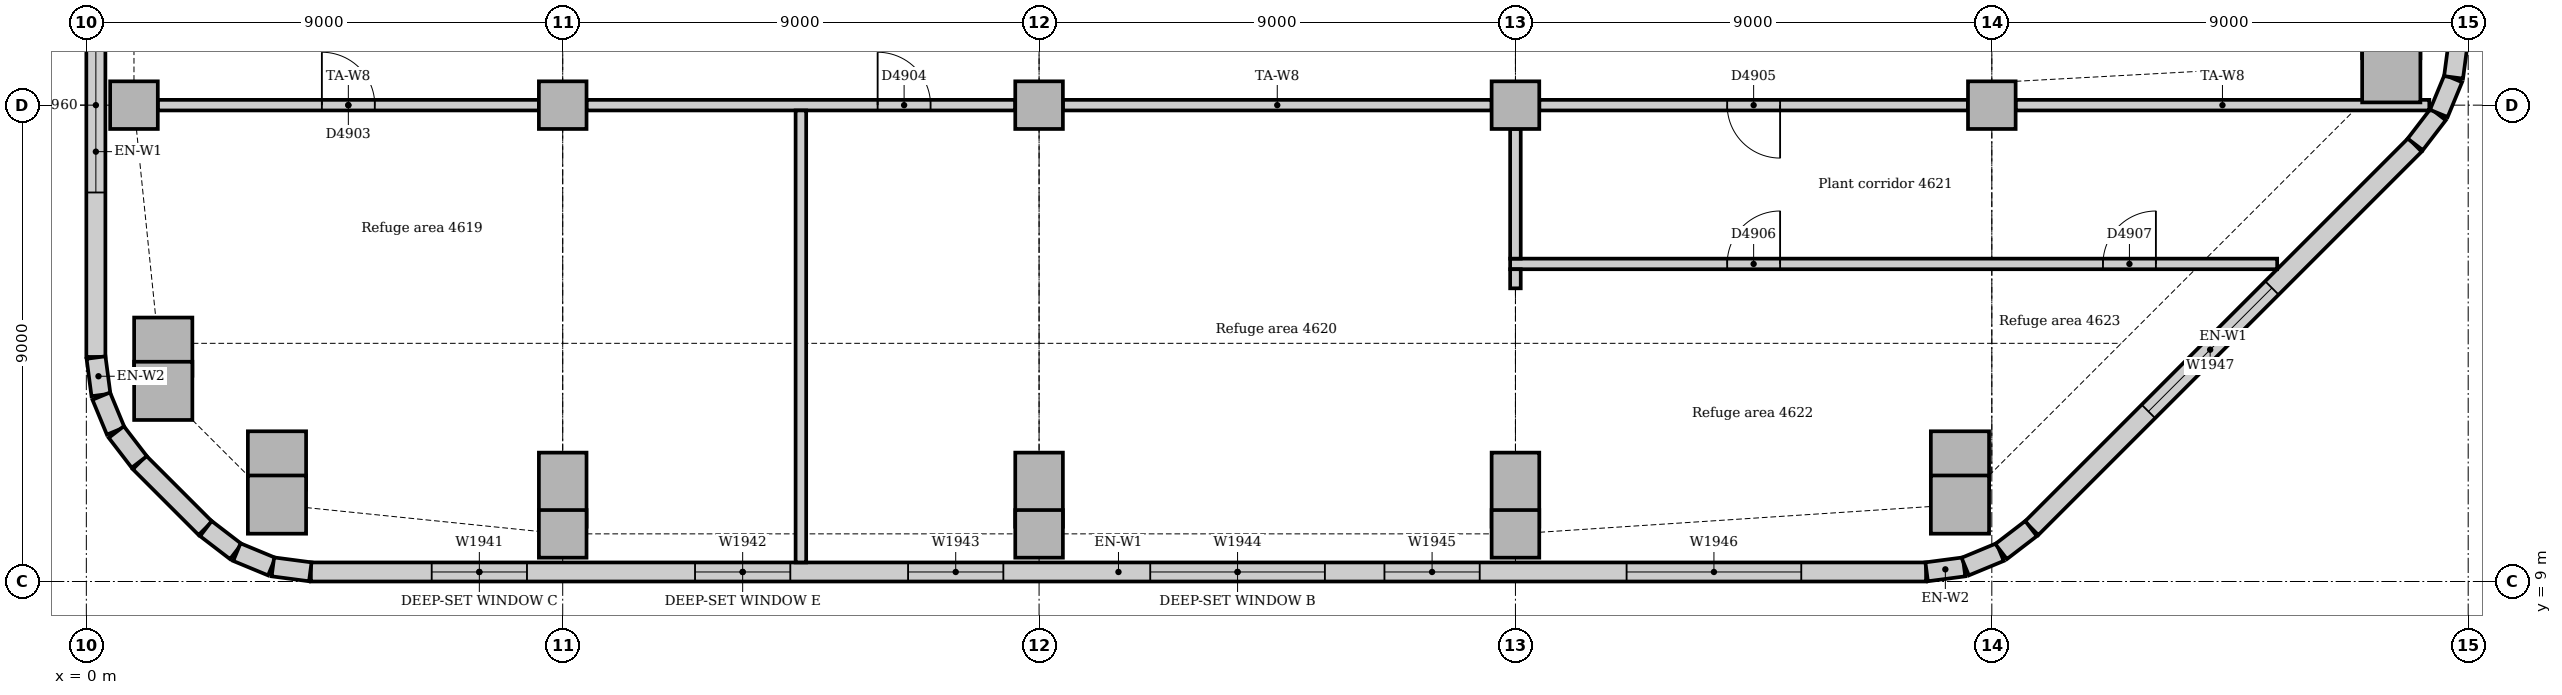
"""IFC4 building model, lengths in metres.
Left out: names, types, materials, properties, quantities, classifications, styles, units other than length and angle.
Written with IfcOpenShell. Run it as: python <this file> out.ifc"""

import sys

from ifc_helpers import new_model, si_unit, direction, frame, frame_2d, origin, origin_2d, place, context, subcontext, project, spatial, rectangle, extrude, element, fill, save


model = new_model("IFC4")
c1 = context("Model", 3, precision=1e-05, world=origin(), true_north=direction((0.0, 1.0)))
c2 = subcontext(c1, "Body", "Model", "MODEL_VIEW")
j1 = project(units=[si_unit("LENGTHUNIT", "METRE"), si_unit("PLANEANGLEUNIT", "RADIAN")], contexts=[c1])
p1 = place(None, origin())
s1 = spatial("IfcSite", under=j1, at=p1, CompositionType="ELEMENT")
p2 = place(p1, origin())
s2 = spatial("IfcBuilding", under=s1, at=p2, CompositionType="ELEMENT")
p3 = place(p2, frame((0.0, 0.0, 193.0)))
s3 = spatial("IfcBuildingStorey", under=s2, at=p3, CompositionType="ELEMENT", Elevation=193.0)
for number, where, z_axis, x_axis in (
    (1, (3.602, 10.453, 0.0), (0.0, 0.0, 1.0), (1.0, 0.0, 0.0)),
    (2, (35.398, 10.453, 0.0), (0.0, 0.0, 1.0), (1.0, 0.0, 0.0)),
    (3, (43.547, 18.602, 0.0), (0.0, 0.0, 1.0), (1.0, 0.0, 0.0)),
    (4, (1.453, 12.602, 0.0), (0.0, 0.0, 1.0), (1.0, 0.0, 0.0)),
):
    element("IfcColumn", number, at=place(p3, frame(where, z_axis=z_axis, x_axis=x_axis)), inside=s3, PredefinedType="COLUMN", context=c2, shape_type="SweptSolid", body=[
        extrude(rectangle(XDim=1.1, YDim=1.1, at=origin_2d()), origin(), (0.0, 0.0, 1.0), 4.85),
    ])
for number, where, z_axis, x_axis in (
    (5, (9.0, 9.9, 0.0), (0.0, 0.0, 1.0), (1.0, 0.0, 0.0)),
    (6, (18.0, 9.9, 0.0), (0.0, 0.0, 1.0), (1.0, 0.0, 0.0)),
    (7, (27.0, 9.9, 0.0), (0.0, 0.0, 1.0), (1.0, 0.0, 0.0)),
    (8, (0.9, 18.0, 0.0), (0.0, 0.0, 1.0), (1.0, 0.0, 0.0)),
    (9, (9.0, 18.0, 0.0), (0.0, 0.0, 1.0), (1.0, 0.0, 0.0)),
    (10, (18.0, 18.0, 0.0), (0.0, 0.0, 1.0), (1.0, 0.0, 0.0)),
    (11, (27.0, 18.0, 0.0), (0.0, 0.0, 1.0), (1.0, 0.0, 0.0)),
    (12, (36.0, 18.0, 0.0), (0.0, 0.0, 1.0), (1.0, 0.0, 0.0)),
):
    element("IfcColumn", number, at=place(p3, frame(where, z_axis=z_axis, x_axis=x_axis)), inside=s3, PredefinedType="COLUMN", context=c2, shape_type="SweptSolid", body=[
        extrude(rectangle(XDim=0.9, YDim=0.9, at=origin_2d()), origin(), (0.0, 0.0, 1.0), 4.85),
    ])
p4 = place(p3, frame((4.243, 9.18, 0.0), z_axis=(0.0, 0.0, 1.0), x_axis=(1.0, 0.0, 0.0)))
e13 = element("IfcWall", 13, at=p4, inside=s3, PredefinedType="STANDARD", context=c2, shape_type="SweptSolid", body=[
    extrude(rectangle(XDim=30.515, YDim=0.36, at=frame_2d((15.257, 0.0))), origin(), (0.0, 0.0, 1.0), 4.85),
])
p5 = place(p4, frame((2.282, 0.0, 1.2)))
e14 = element("IfcOpeningElement", 14, at=p5, cuts=e13, PredefinedType="OPENING", context=c2, shape_type="SweptSolid", body=[
    extrude(rectangle(XDim=1.8, YDim=1.2, at=frame_2d((0.9, 0.6))), frame((0.0, 0.19, 0.0), z_axis=(0.0, -1.0, 0.0), x_axis=(1.0, 0.0, 0.0)), (0.0, 0.0, 1.0), 0.38),
])
p6 = place(p4, frame((7.257, 0.0, 0.9)))
e15 = element("IfcOpeningElement", 15, at=p6, cuts=e13, PredefinedType="OPENING", context=c2, shape_type="SweptSolid", body=[
    extrude(rectangle(XDim=1.8, YDim=2.2, at=frame_2d((0.9, 1.1))), frame((0.0, 0.19, 0.0), z_axis=(0.0, -1.0, 0.0), x_axis=(1.0, 0.0, 0.0)), (0.0, 0.0, 1.0), 0.38),
])
p7 = place(p4, frame((11.282, 0.0, 1.2)))
e16 = element("IfcOpeningElement", 16, at=p7, cuts=e13, PredefinedType="OPENING", context=c2, shape_type="SweptSolid", body=[
    extrude(rectangle(XDim=1.8, YDim=1.2, at=frame_2d((0.9, 0.6))), frame((0.0, 0.19, 0.0), z_axis=(0.0, -1.0, 0.0), x_axis=(1.0, 0.0, 0.0)), (0.0, 0.0, 1.0), 0.38),
])
p8 = place(p4, frame((15.857, 0.0, 0.9)))
e17 = element("IfcOpeningElement", 17, at=p8, cuts=e13, PredefinedType="OPENING", context=c2, shape_type="SweptSolid", body=[
    extrude(rectangle(XDim=3.3, YDim=2.2, at=frame_2d((1.65, 1.1))), frame((0.0, 0.19, 0.0), z_axis=(0.0, -1.0, 0.0), x_axis=(1.0, 0.0, 0.0)), (0.0, 0.0, 1.0), 0.38),
])
p9 = place(p4, frame((20.282, 0.0, 1.2)))
e18 = element("IfcOpeningElement", 18, at=p9, cuts=e13, PredefinedType="OPENING", context=c2, shape_type="SweptSolid", body=[
    extrude(rectangle(XDim=1.8, YDim=1.2, at=frame_2d((0.9, 0.6))), frame((0.0, 0.19, 0.0), z_axis=(0.0, -1.0, 0.0), x_axis=(1.0, 0.0, 0.0)), (0.0, 0.0, 1.0), 0.38),
])
p10 = place(p4, frame((24.857, 0.0, 0.9)))
e19 = element("IfcOpeningElement", 19, at=p10, cuts=e13, PredefinedType="OPENING", context=c2, shape_type="SweptSolid", body=[
    extrude(rectangle(XDim=3.3, YDim=2.2, at=frame_2d((1.65, 1.1))), frame((0.0, 0.19, 0.0), z_axis=(0.0, -1.0, 0.0), x_axis=(1.0, 0.0, 0.0)), (0.0, 0.0, 1.0), 0.38),
])
p11 = place(p3, frame((36.751, 10.006, 0.0), z_axis=(0.0, 0.0, 1.0), x_axis=(0.707106781187, 0.707106781187, 0.0)))
e20 = element("IfcWall", 20, at=p11, inside=s3, PredefinedType="STANDARD", context=c2, shape_type="SweptSolid", body=[
    extrude(rectangle(XDim=10.243, YDim=0.36, at=frame_2d((5.121, 0.0))), origin(), (0.0, 0.0, 1.0), 4.85),
])
p12 = place(p11, frame((3.121, 0.0, 0.9)))
e21 = element("IfcOpeningElement", 21, at=p12, cuts=e20, PredefinedType="OPENING", context=c2, shape_type="SweptSolid", body=[
    extrude(rectangle(XDim=3.3, YDim=2.2, at=frame_2d((1.65, 1.1))), frame((0.0, 0.19, 0.0), z_axis=(0.0, -1.0, 0.0), x_axis=(1.0, 0.0, 0.0)), (0.0, 0.0, 1.0), 0.38),
])
p13 = place(p3, frame((0.18, 21.0, 0.0), z_axis=(0.0, 0.0, 1.0), x_axis=(0.0, -1.0, 0.0)))
e22 = element("IfcWall", 22, at=p13, inside=s3, PredefinedType="STANDARD", context=c2, shape_type="SweptSolid", body=[
    extrude(rectangle(XDim=7.757, YDim=0.36, at=frame_2d((3.879, 0.0))), origin(), (0.0, 0.0, 1.0), 4.85),
])
p14 = place(p13, frame((1.35, 0.0, 0.9)))
e23 = element("IfcOpeningElement", 23, at=p14, cuts=e22, PredefinedType="OPENING", context=c2, shape_type="SweptSolid", body=[
    extrude(rectangle(XDim=3.3, YDim=2.2, at=frame_2d((1.65, 1.1))), frame((0.0, 0.19, 0.0), z_axis=(0.0, -1.0, 0.0), x_axis=(1.0, 0.0, 0.0)), (0.0, 0.0, 1.0), 0.38),
])
p15 = place(p3, frame((1.006, 11.249, 0.0), z_axis=(0.0, 0.0, 1.0), x_axis=(0.707106781187, -0.707106781187, 0.0)))
e24 = element("IfcWall", 24, at=p15, inside=s3, PredefinedType="STANDARD", context=c2, shape_type="SweptSolid", body=[
    extrude(rectangle(XDim=1.757, YDim=0.36, at=frame_2d((0.879, 0.0))), origin(), (0.0, 0.0, 1.0), 4.85),
])
for number, where, z_axis, x_axis in (
    (25, (34.769, 9.183, 0.0), (0.0, 0.0, 1.0), (0.991, 0.131, 0.0)),
    (26, (35.497, 9.282, 0.0), (0.0, 0.0, 1.0), (0.924, 0.383, 0.0)),
):
    element("IfcWall", number, at=place(p3, frame(where, z_axis=z_axis, x_axis=x_axis)), inside=s3, PredefinedType="STANDARD", context=c2, shape_type="SweptSolid", body=[
        extrude(rectangle(XDim=0.713, YDim=0.36, at=frame_2d((0.356, 0.0))), origin(), (0.0, 0.0, 1.0), 4.85),
    ])
for number, where, z_axis, x_axis in (
    (27, (36.175, 9.566, 0.0), (0.0, 0.0, 1.0), (0.793, 0.609, 0.0)),
    (28, (44.0, 17.259, 0.0), (0.0, 0.0, 1.0), (0.609, 0.793, 0.0)),
):
    element("IfcWall", number, at=place(p3, frame(where, z_axis=z_axis, x_axis=x_axis)), inside=s3, PredefinedType="STANDARD", context=c2, shape_type="SweptSolid", body=[
        extrude(rectangle(XDim=0.713, YDim=0.36, at=frame_2d((0.357, 0.0))), origin(), (0.0, 0.0, 1.0), 4.85),
    ])
for number, where, z_axis, x_axis in (
    (29, (44.445, 17.844, 0.0), (0.0, 0.0, 1.0), (0.383, 0.924, 0.0)),
    (30, (44.724, 18.524, 0.0), (0.0, 0.0, 1.0), (0.131, 0.991, 0.0)),
    (31, (0.183, 13.231, 0.0), (0.0, 0.0, 1.0), (0.131, -0.991, 0.0)),
    (32, (0.282, 12.503, 0.0), (0.0, 0.0, 1.0), (0.383, -0.924, 0.0)),
):
    element("IfcWall", number, at=place(p3, frame(where, z_axis=z_axis, x_axis=x_axis)), inside=s3, PredefinedType="STANDARD", context=c2, shape_type="SweptSolid", body=[
        extrude(rectangle(XDim=0.713, YDim=0.36, at=frame_2d((0.356, 0.0))), origin(), (0.0, 0.0, 1.0), 4.85),
    ])
for number, where, z_axis, x_axis in (
    (33, (0.566, 11.825, 0.0), (0.0, 0.0, 1.0), (0.609, -0.793, 0.0)),
    (34, (2.259, 10.0, 0.0), (0.0, 0.0, 1.0), (0.793, -0.609, 0.0)),
):
    element("IfcWall", number, at=place(p3, frame(where, z_axis=z_axis, x_axis=x_axis)), inside=s3, PredefinedType="STANDARD", context=c2, shape_type="SweptSolid", body=[
        extrude(rectangle(XDim=0.713, YDim=0.36, at=frame_2d((0.357, 0.0))), origin(), (0.0, 0.0, 1.0), 4.85),
    ])
for number, where, z_axis, x_axis in (
    (35, (2.844, 9.555, 0.0), (0.0, 0.0, 1.0), (0.924, -0.383, 0.0)),
    (36, (3.524, 9.276, 0.0), (0.0, 0.0, 1.0), (0.991, -0.131, 0.0)),
):
    element("IfcWall", number, at=place(p3, frame(where, z_axis=z_axis, x_axis=x_axis)), inside=s3, PredefinedType="STANDARD", context=c2, shape_type="SweptSolid", body=[
        extrude(rectangle(XDim=0.713, YDim=0.36, at=frame_2d((0.356, 0.0))), origin(), (0.0, 0.0, 1.0), 4.85),
    ])
p16 = place(p3, frame((1.35, 18.0, 0.0), z_axis=(0.0, 0.0, 1.0), x_axis=(1.0, 0.0, 0.0)))
e37 = element("IfcWall", 37, at=p16, inside=s3, PredefinedType="PARTITIONING", context=c2, shape_type="SweptSolid", body=[
    extrude(rectangle(XDim=7.2, YDim=0.2, at=frame_2d((3.6, 0.0))), origin(), (0.0, 0.0, 1.0), 4.41),
])
p17 = place(p16, frame((3.1, 0.0, 0.0)))
e38 = element("IfcOpeningElement", 38, at=p17, cuts=e37, PredefinedType="OPENING", context=c2, shape_type="SweptSolid", body=[
    extrude(rectangle(XDim=1.0, YDim=2.1, at=frame_2d((0.5, 1.05))), frame((0.0, 0.11, 0.0), z_axis=(0.0, -1.0, 0.0), x_axis=(1.0, 0.0, 0.0)), (0.0, 0.0, 1.0), 0.22),
])
p18 = place(p3, frame((9.45, 18.0, 0.0), z_axis=(0.0, 0.0, 1.0), x_axis=(1.0, 0.0, 0.0)))
e39 = element("IfcWall", 39, at=p18, inside=s3, PredefinedType="PARTITIONING", context=c2, shape_type="SweptSolid", body=[
    extrude(rectangle(XDim=8.1, YDim=0.2, at=frame_2d((4.05, 0.0))), origin(), (0.0, 0.0, 1.0), 4.254),
])
p19 = place(p18, frame((5.5, 0.0, 0.0)))
e40 = element("IfcOpeningElement", 40, at=p19, cuts=e39, PredefinedType="OPENING", context=c2, shape_type="SweptSolid", body=[
    extrude(rectangle(XDim=1.0, YDim=2.1, at=frame_2d((0.5, 1.05))), frame((0.0, 0.11, 0.0), z_axis=(0.0, -1.0, 0.0), x_axis=(1.0, 0.0, 0.0)), (0.0, 0.0, 1.0), 0.22),
])
p20 = place(p3, frame((18.45, 18.0, 0.0), z_axis=(0.0, 0.0, 1.0), x_axis=(1.0, 0.0, 0.0)))
e41 = element("IfcWall", 41, at=p20, inside=s3, PredefinedType="PARTITIONING", context=c2, shape_type="SweptSolid", body=[
    extrude(rectangle(XDim=8.1, YDim=0.2, at=frame_2d((4.05, 0.0))), origin(), (0.0, 0.0, 1.0), 4.254),
])
p21 = place(p3, frame((27.45, 18.0, 0.0), z_axis=(0.0, 0.0, 1.0), x_axis=(1.0, 0.0, 0.0)))
e42 = element("IfcWall", 42, at=p21, inside=s3, PredefinedType="PARTITIONING", context=c2, shape_type="SweptSolid", body=[
    extrude(rectangle(XDim=8.1, YDim=0.2, at=frame_2d((4.05, 0.0))), origin(), (0.0, 0.0, 1.0), 4.254),
])
p22 = place(p21, frame((3.55, 0.0, 0.0)))
e43 = element("IfcOpeningElement", 43, at=p22, cuts=e42, PredefinedType="OPENING", context=c2, shape_type="SweptSolid", body=[
    extrude(rectangle(XDim=1.0, YDim=2.1, at=frame_2d((0.5, 1.05))), frame((0.0, 0.11, 0.0), z_axis=(0.0, -1.0, 0.0), x_axis=(1.0, 0.0, 0.0)), (0.0, 0.0, 1.0), 0.22),
])
p23 = place(p3, frame((36.45, 18.0, 0.0), z_axis=(0.0, 0.0, 1.0), x_axis=(1.0, 0.0, 0.0)))
e44 = element("IfcWall", 44, at=p23, inside=s3, PredefinedType="PARTITIONING", context=c2, shape_type="SweptSolid", body=[
    extrude(rectangle(XDim=7.815, YDim=0.2, at=frame_2d((3.908, 0.0))), origin(), (0.0, 0.0, 1.0), 4.602),
])
p24 = place(p3, frame((26.9, 15.0, 0.0), z_axis=(0.0, 0.0, 1.0), x_axis=(1.0, 0.0, 0.0)))
e45 = element("IfcWall", 45, at=p24, inside=s3, PredefinedType="PARTITIONING", context=c2, shape_type="SweptSolid", body=[
    extrude(rectangle(XDim=14.491, YDim=0.2, at=frame_2d((7.245, 0.0))), origin(), (0.0, 0.0, 1.0), 4.46),
])
p25 = place(p24, frame((4.1, 0.0, 0.0)))
e46 = element("IfcOpeningElement", 46, at=p25, cuts=e45, PredefinedType="OPENING", context=c2, shape_type="SweptSolid", body=[
    extrude(rectangle(XDim=1.0, YDim=2.1, at=frame_2d((0.5, 1.05))), frame((0.0, 0.11, 0.0), z_axis=(0.0, -1.0, 0.0), x_axis=(1.0, 0.0, 0.0)), (0.0, 0.0, 1.0), 0.22),
])
p26 = place(p24, frame((11.2, 0.0, 0.0)))
e47 = element("IfcOpeningElement", 47, at=p26, cuts=e45, PredefinedType="OPENING", context=c2, shape_type="SweptSolid", body=[
    extrude(rectangle(XDim=1.0, YDim=2.1, at=frame_2d((0.5, 1.05))), frame((0.0, 0.11, 0.0), z_axis=(0.0, -1.0, 0.0), x_axis=(1.0, 0.0, 0.0)), (0.0, 0.0, 1.0), 0.22),
])
p27 = place(p3, frame((13.5, 9.36, 0.0), z_axis=(0.0, 0.0, 1.0), x_axis=(0.0, 1.0, 0.0)))
e48 = element("IfcWall", 48, at=p27, inside=s3, PredefinedType="PARTITIONING", context=c2, shape_type="SweptSolid", body=[
    extrude(rectangle(XDim=8.54, YDim=0.2, at=frame_2d((4.27, 0.0))), origin(), (0.0, 0.0, 1.0), 4.85),
])
p28 = place(p3, frame((27.0, 14.539, 0.0), z_axis=(0.0, 0.0, 1.0), x_axis=(0.0, 1.0, 0.0)))
e49 = element("IfcWall", 49, at=p28, inside=s3, PredefinedType="PARTITIONING", context=c2, shape_type="SweptSolid", body=[
    extrude(rectangle(XDim=0.361, YDim=0.2, at=frame_2d((0.18, 0.0))), origin(), (0.0, 0.0, 1.0), 4.85),
])
p29 = place(p3, frame((27.0, 15.1, 0.0), z_axis=(0.0, 0.0, 1.0), x_axis=(0.0, 1.0, 0.0)))
e50 = element("IfcWall", 50, at=p29, inside=s3, PredefinedType="PARTITIONING", context=c2, shape_type="SweptSolid", body=[
    extrude(rectangle(XDim=2.45, YDim=0.2, at=frame_2d((1.225, 0.0))), origin(), (0.0, 0.0, 1.0), 4.85),
])
p30 = place(p5, origin())
e51 = element("IfcWindow", 51, at=p30, inside=s3, PartitioningType="SINGLE_PANEL", PredefinedType="WINDOW", context=c2, shape_type="SweptSolid", body=[
    extrude(rectangle(XDim=1.8, YDim=1.2, at=frame_2d((0.9, 0.6))), frame((0.0, 0.13, 0.0), z_axis=(0.0, -1.0, 0.0), x_axis=(1.0, 0.0, 0.0)), (0.0, 0.0, 1.0), 0.06),
])
fill(e14, e51)
p31 = place(p6, origin())
e52 = element("IfcWindow", 52, at=p31, inside=s3, PartitioningType="SINGLE_PANEL", PredefinedType="WINDOW", context=c2, shape_type="SweptSolid", body=[
    extrude(rectangle(XDim=1.8, YDim=2.2, at=frame_2d((0.9, 1.1))), frame((0.0, 0.13, 0.0), z_axis=(0.0, -1.0, 0.0), x_axis=(1.0, 0.0, 0.0)), (0.0, 0.0, 1.0), 0.06),
])
fill(e15, e52)
p32 = place(p7, origin())
e53 = element("IfcWindow", 53, at=p32, inside=s3, PartitioningType="SINGLE_PANEL", PredefinedType="WINDOW", context=c2, shape_type="SweptSolid", body=[
    extrude(rectangle(XDim=1.8, YDim=1.2, at=frame_2d((0.9, 0.6))), frame((0.0, 0.13, 0.0), z_axis=(0.0, -1.0, 0.0), x_axis=(1.0, 0.0, 0.0)), (0.0, 0.0, 1.0), 0.06),
])
fill(e16, e53)
p33 = place(p8, origin())
e54 = element("IfcWindow", 54, at=p33, inside=s3, PartitioningType="SINGLE_PANEL", PredefinedType="WINDOW", context=c2, shape_type="SweptSolid", body=[
    extrude(rectangle(XDim=3.3, YDim=2.2, at=frame_2d((1.65, 1.1))), frame((0.0, 0.13, 0.0), z_axis=(0.0, -1.0, 0.0), x_axis=(1.0, 0.0, 0.0)), (0.0, 0.0, 1.0), 0.06),
])
fill(e17, e54)
p34 = place(p9, origin())
e55 = element("IfcWindow", 55, at=p34, inside=s3, PartitioningType="SINGLE_PANEL", PredefinedType="WINDOW", context=c2, shape_type="SweptSolid", body=[
    extrude(rectangle(XDim=1.8, YDim=1.2, at=frame_2d((0.9, 0.6))), frame((0.0, 0.13, 0.0), z_axis=(0.0, -1.0, 0.0), x_axis=(1.0, 0.0, 0.0)), (0.0, 0.0, 1.0), 0.06),
])
fill(e18, e55)
p35 = place(p10, origin())
e56 = element("IfcWindow", 56, at=p35, inside=s3, PartitioningType="SINGLE_PANEL", PredefinedType="WINDOW", context=c2, shape_type="SweptSolid", body=[
    extrude(rectangle(XDim=3.3, YDim=2.2, at=frame_2d((1.65, 1.1))), frame((0.0, 0.13, 0.0), z_axis=(0.0, -1.0, 0.0), x_axis=(1.0, 0.0, 0.0)), (0.0, 0.0, 1.0), 0.06),
])
fill(e19, e56)
p36 = place(p12, origin())
e57 = element("IfcWindow", 57, at=p36, inside=s3, PartitioningType="SINGLE_PANEL", PredefinedType="WINDOW", context=c2, shape_type="SweptSolid", body=[
    extrude(rectangle(XDim=3.3, YDim=2.2, at=frame_2d((1.65, 1.1))), frame((0.0, 0.13, 0.0), z_axis=(0.0, -1.0, 0.0), x_axis=(1.0, 0.0, 0.0)), (0.0, 0.0, 1.0), 0.06),
])
fill(e21, e57)
p37 = place(p14, origin())
e58 = element("IfcWindow", 58, at=p37, inside=s3, PartitioningType="SINGLE_PANEL", PredefinedType="WINDOW", context=c2, shape_type="SweptSolid", body=[
    extrude(rectangle(XDim=3.3, YDim=2.2, at=frame_2d((1.65, 1.1))), frame((0.0, 0.13, 0.0), z_axis=(0.0, -1.0, 0.0), x_axis=(1.0, 0.0, 0.0)), (0.0, 0.0, 1.0), 0.06),
])
fill(e23, e58)
p38 = place(p17, origin())
e59 = element("IfcDoor", 59, at=p38, inside=s3, OperationType="SINGLE_SWING_LEFT", PredefinedType="DOOR", context=c2, shape_type="SweptSolid", body=[
    extrude(rectangle(XDim=1.0, YDim=2.1, at=frame_2d((0.5, 1.05))), frame((0.0, 0.025, 0.0), z_axis=(0.0, -1.0, 0.0), x_axis=(1.0, 0.0, 0.0)), (0.0, 0.0, 1.0), 0.05),
])
fill(e38, e59)
p39 = place(p19, origin())
e60 = element("IfcDoor", 60, at=p39, inside=s3, OperationType="SINGLE_SWING_LEFT", PredefinedType="DOOR", context=c2, shape_type="SweptSolid", body=[
    extrude(rectangle(XDim=1.0, YDim=2.1, at=frame_2d((0.5, 1.05))), frame((0.0, 0.025, 0.0), z_axis=(0.0, -1.0, 0.0), x_axis=(1.0, 0.0, 0.0)), (0.0, 0.0, 1.0), 0.05),
])
fill(e40, e60)
p40 = place(p22, frame((1.0, 0.0, 0.0), z_axis=(0.0, 0.0, 1.0), x_axis=(-1.0, 0.0, 0.0)))
e61 = element("IfcDoor", 61, at=p40, inside=s3, OperationType="SINGLE_SWING_LEFT", PredefinedType="DOOR", context=c2, shape_type="SweptSolid", body=[
    extrude(rectangle(XDim=1.0, YDim=2.1, at=frame_2d((0.5, 1.05))), frame((0.0, 0.025, 0.0), z_axis=(0.0, -1.0, 0.0), x_axis=(1.0, 0.0, 0.0)), (0.0, 0.0, 1.0), 0.05),
])
fill(e43, e61)
p41 = place(p25, origin())
e62 = element("IfcDoor", 62, at=p41, inside=s3, OperationType="SINGLE_SWING_RIGHT", PredefinedType="DOOR", context=c2, shape_type="SweptSolid", body=[
    extrude(rectangle(XDim=1.0, YDim=2.1, at=frame_2d((0.5, 1.05))), frame((0.0, 0.025, 0.0), z_axis=(0.0, -1.0, 0.0), x_axis=(1.0, 0.0, 0.0)), (0.0, 0.0, 1.0), 0.05),
])
fill(e46, e62)
p42 = place(p26, origin())
e63 = element("IfcDoor", 63, at=p42, inside=s3, OperationType="SINGLE_SWING_RIGHT", PredefinedType="DOOR", context=c2, shape_type="SweptSolid", body=[
    extrude(rectangle(XDim=1.0, YDim=2.1, at=frame_2d((0.5, 1.05))), frame((0.0, 0.025, 0.0), z_axis=(0.0, -1.0, 0.0), x_axis=(1.0, 0.0, 0.0)), (0.0, 0.0, 1.0), 0.05),
])
fill(e47, e63)
save(model, sys.argv[1])
